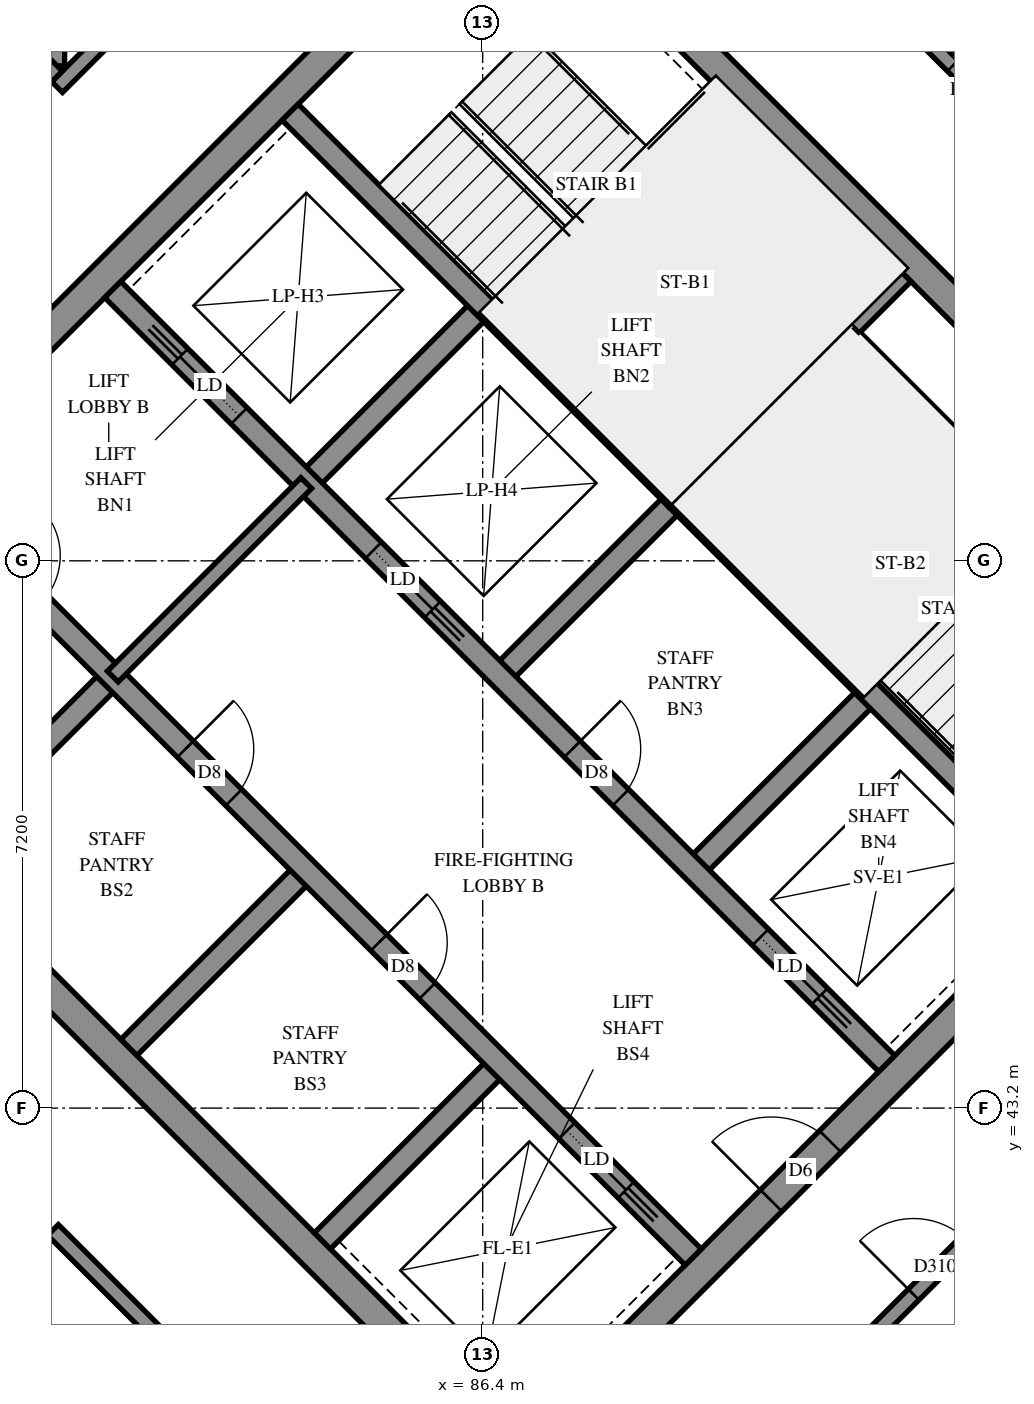
"""IFC4 building model, lengths in metres.
Left out: names, types, materials, properties, quantities, classifications, styles, units other than length and angle.
Written with IfcOpenShell. Run it as: python <this file> out.ifc"""

import sys

from ifc_helpers import new_model, si_unit, direction, frame, frame_2d, origin, place, context, subcontext, project, spatial, polyline, rectangle, outline, extrude, element, fill, save


model = new_model("IFC4")
c1 = context("Model", 3, precision=1e-05, world=origin(), true_north=direction((0.0, 1.0)))
c2 = subcontext(c1, "Body", "Model", "MODEL_VIEW")
j1 = project(units=[si_unit("LENGTHUNIT", "METRE"), si_unit("PLANEANGLEUNIT", "RADIAN")], contexts=[c1])
p1 = place(None, origin())
s1 = spatial("IfcSite", under=j1, at=p1, CompositionType="ELEMENT")
p2 = place(p1, origin())
s2 = spatial("IfcBuilding", under=s1, at=p2, CompositionType="ELEMENT")
p3 = place(p2, frame((0.0, 0.0, 281.2)))
s3 = spatial("IfcBuildingStorey", under=s2, at=p3, CompositionType="ELEMENT", Elevation=281.2)
p4 = place(p3, frame((76.23, 49.231, -0.3), z_axis=(0.0, 0.0, 1.0), x_axis=(0.7071034917, -0.7071100706, 0.0)))
e1 = element("IfcWall", 1, at=p4, inside=s3, PredefinedType="SHEAR", context=c2, shape_type="SweptSolid", body=[
    extrude(rectangle(XDim=15.2, YDim=0.4, at=frame_2d((7.6, 0.0))), origin(), (0.0, 0.0, 1.0), 2.7),
])
p5 = place(p3, frame((86.695, 59.696, -0.3), z_axis=(0.0, 0.0, 1.0), x_axis=(0.7071100706, -0.7071034917, 0.0)))
e2 = element("IfcWall", 2, at=p5, inside=s3, PredefinedType="SHEAR", context=c2, shape_type="SweptSolid", body=[
    extrude(rectangle(XDim=15.2, YDim=0.4, at=frame_2d((7.6, 0.0))), origin(), (0.0, 0.0, 1.0), 2.7),
])
p6 = place(p5, frame((10.4, 0.0, 0.3)))
e3 = element("IfcOpeningElement", 3, at=p6, cuts=e2, PredefinedType="OPENING", context=c2, shape_type="SweptSolid", body=[
    extrude(rectangle(XDim=0.8, YDim=2.1, at=frame_2d((0.4, 1.05))), frame((0.0, 0.21, 0.0), z_axis=(0.0, -1.0, 0.0), x_axis=(1.0, 0.0, 0.0)), (0.0, 0.0, 1.0), 0.42),
])
p7 = place(p3, frame((76.513, 49.231, -0.3), z_axis=(0.0, 0.0, 1.0), x_axis=(0.7071067812, 0.7071067812, 0.0)))
e4 = element("IfcWall", 4, at=p7, inside=s3, PredefinedType="SHEAR", context=c2, shape_type="SweptSolid", body=[
    extrude(rectangle(XDim=14.4, YDim=0.4, at=frame_2d((7.2, 0.0))), origin(), (0.0, 0.0, 1.0), 2.7),
])
p8 = place(p7, frame((4.55, 0.0, 0.3)))
e5 = element("IfcOpeningElement", 5, at=p8, cuts=e4, PredefinedType="OPENING", context=c2, shape_type="SweptSolid", body=[
    extrude(rectangle(XDim=1.1, YDim=2.1, at=frame_2d((0.55, 1.05))), frame((0.0, 0.21, 0.0), z_axis=(0.0, -1.0, 0.0), x_axis=(1.0, 0.0, 0.0)), (0.0, 0.0, 1.0), 0.42),
])
p9 = place(p7, frame((11.35, 0.0, 0.3)))
e6 = element("IfcOpeningElement", 6, at=p9, cuts=e4, PredefinedType="OPENING", context=c2, shape_type="SweptSolid", body=[
    extrude(rectangle(XDim=1.1, YDim=2.1, at=frame_2d((0.55, 1.05))), frame((0.0, 0.21, 0.0), z_axis=(0.0, -1.0, 0.0), x_axis=(1.0, 0.0, 0.0)), (0.0, 0.0, 1.0), 0.42),
])
p10 = place(p3, frame((86.978, 38.766, -0.3), z_axis=(0.0, 0.0, 1.0), x_axis=(0.7071067812, 0.7071067812, 0.0)))
e7 = element("IfcWall", 7, at=p10, inside=s3, PredefinedType="SHEAR", context=c2, shape_type="SweptSolid", body=[
    extrude(rectangle(XDim=14.4, YDim=0.4, at=frame_2d((7.2, 0.0))), origin(), (0.0, 0.0, 1.0), 2.7),
])
p11 = place(p10, frame((4.55, 0.0, 0.3)))
e8 = element("IfcOpeningElement", 8, at=p11, cuts=e7, PredefinedType="OPENING", context=c2, shape_type="SweptSolid", body=[
    extrude(rectangle(XDim=1.1, YDim=2.1, at=frame_2d((0.55, 1.05))), frame((0.0, 0.21, 0.0), z_axis=(0.0, -1.0, 0.0), x_axis=(1.0, 0.0, 0.0)), (0.0, 0.0, 1.0), 0.42),
])
p12 = place(p10, frame((11.35, 0.0, 0.3)))
e9 = element("IfcOpeningElement", 9, at=p12, cuts=e7, PredefinedType="OPENING", context=c2, shape_type="SweptSolid", body=[
    extrude(rectangle(XDim=1.1, YDim=2.1, at=frame_2d((0.55, 1.05))), frame((0.0, 0.21, 0.0), z_axis=(0.0, -1.0, 0.0), x_axis=(1.0, 0.0, 0.0)), (0.0, 0.0, 1.0), 0.42),
])
for number, where, z_axis, x_axis in (
    (10, (79.2, 46.544, 0.0), (0.0, 0.0, 1.0), (0.707, 0.707, 0.0)),
    (11, (84.079, 51.423, 0.0), (0.0, 0.0, 1.0), (0.707, 0.707, 0.0)),
):
    element("IfcWall", number, at=place(p3, frame(where, z_axis=z_axis, x_axis=x_axis)), inside=s3, PredefinedType="SOLIDWALL", context=c2, shape_type="SweptSolid", body=[
        extrude(rectangle(XDim=3.3, YDim=0.3, at=frame_2d((1.65, 0.0))), origin(), (0.0, 0.0, 1.0), 3.1),
    ])
p13 = place(p3, frame((81.746, 43.999, 0.0), z_axis=(0.0, 0.0, 1.0), x_axis=(0.7071067812, 0.7071067812, 0.0)))
e12 = element("IfcWall", 12, at=p13, inside=s3, PredefinedType="SOLIDWALL", context=c2, shape_type="SweptSolid", body=[
    extrude(rectangle(XDim=3.3, YDim=0.3, at=frame_2d((1.65, 0.0))), origin(), (0.0, 0.0, 1.0), 3.1),
])
p14 = place(p3, frame((86.625, 48.878, 0.0), z_axis=(0.0, 0.0, 1.0), x_axis=(0.7071067812, 0.7071067812, 0.0)))
e13 = element("IfcWall", 13, at=p14, inside=s3, PredefinedType="SOLIDWALL", context=c2, shape_type="SweptSolid", body=[
    extrude(rectangle(XDim=3.3, YDim=0.3, at=frame_2d((1.65, 0.0))), origin(), (0.0, 0.0, 1.0), 3.1),
])
p15 = place(p3, frame((84.291, 41.453, 0.0), z_axis=(0.0, 0.0, 1.0), x_axis=(0.7071067812, 0.7071067812, 0.0)))
e14 = element("IfcWall", 14, at=p15, inside=s3, PredefinedType="SOLIDWALL", context=c2, shape_type="SweptSolid", body=[
    extrude(rectangle(XDim=3.3, YDim=0.3, at=frame_2d((1.65, 0.0))), origin(), (0.0, 0.0, 1.0), 3.1),
])
p16 = place(p3, frame((89.17, 46.332, 0.0), z_axis=(0.0, 0.0, 1.0), x_axis=(0.7071067812, 0.7071067812, 0.0)))
e15 = element("IfcWall", 15, at=p16, inside=s3, PredefinedType="SOLIDWALL", context=c2, shape_type="SweptSolid", body=[
    extrude(rectangle(XDim=3.3, YDim=0.3, at=frame_2d((1.65, 0.0))), origin(), (0.0, 0.0, 1.0), 3.1),
])
p17 = place(p3, frame((78.988, 51.423, 0.0), z_axis=(0.0, 0.0, 1.0), x_axis=(0.7071067812, -0.7071067812, 0.0)))
e16 = element("IfcWall", 16, at=p17, inside=s3, PredefinedType="SOLIDWALL", context=c2, shape_type="SweptSolid", body=[
    extrude(rectangle(XDim=14.4, YDim=0.3, at=frame_2d((7.2, 0.0))), origin(), (0.0, 0.0, 1.0), 3.1),
])
p18 = place(p17, frame((1.35, 0.0, 0.0)))
e17 = element("IfcOpeningElement", 17, at=p18, cuts=e16, PredefinedType="OPENING", context=c2, shape_type="SweptSolid", body=[
    extrude(rectangle(XDim=0.9, YDim=2.1, at=frame_2d((0.45, 1.05))), frame((0.0, 0.16, 0.0), z_axis=(0.0, -1.0, 0.0), x_axis=(1.0, 0.0, 0.0)), (0.0, 0.0, 1.0), 0.32),
])
p19 = place(p17, frame((4.95, 0.0, 0.0)))
e18 = element("IfcOpeningElement", 18, at=p19, cuts=e16, PredefinedType="OPENING", context=c2, shape_type="SweptSolid", body=[
    extrude(rectangle(XDim=0.9, YDim=2.1, at=frame_2d((0.45, 1.05))), frame((0.0, 0.16, 0.0), z_axis=(0.0, -1.0, 0.0), x_axis=(1.0, 0.0, 0.0)), (0.0, 0.0, 1.0), 0.32),
])
p20 = place(p17, frame((8.55, 0.0, 0.0)))
e19 = element("IfcOpeningElement", 19, at=p20, cuts=e16, PredefinedType="OPENING", context=c2, shape_type="SweptSolid", body=[
    extrude(rectangle(XDim=0.9, YDim=2.1, at=frame_2d((0.45, 1.05))), frame((0.0, 0.16, 0.0), z_axis=(0.0, -1.0, 0.0), x_axis=(1.0, 0.0, 0.0)), (0.0, 0.0, 1.0), 0.32),
])
p21 = place(p17, frame((12.05, 0.0, 0.0)))
e20 = element("IfcOpeningElement", 20, at=p21, cuts=e16, PredefinedType="OPENING", context=c2, shape_type="SweptSolid", body=[
    extrude(rectangle(XDim=1.1, YDim=2.1, at=frame_2d((0.55, 1.05))), frame((0.0, 0.16, 0.0), z_axis=(0.0, -1.0, 0.0), x_axis=(1.0, 0.0, 0.0)), (0.0, 0.0, 1.0), 0.32),
])
p22 = place(p3, frame((81.534, 53.969, 0.0), z_axis=(0.0, 0.0, 1.0), x_axis=(0.707103309, -0.7071102534, 0.0)))
e21 = element("IfcWall", 21, at=p22, inside=s3, PredefinedType="SOLIDWALL", context=c2, shape_type="SweptSolid", body=[
    extrude(rectangle(XDim=14.4, YDim=0.3, at=frame_2d((7.2, 0.0))), origin(), (0.0, 0.0, 1.0), 3.1),
])
p23 = place(p22, frame((8.55, 0.0, 0.0)))
e22 = element("IfcOpeningElement", 22, at=p23, cuts=e21, PredefinedType="OPENING", context=c2, shape_type="SweptSolid", body=[
    extrude(rectangle(XDim=0.9, YDim=2.1, at=frame_2d((0.45, 1.05))), frame((0.0, 0.16, 0.0), z_axis=(0.0, -1.0, 0.0), x_axis=(1.0, 0.0, 0.0)), (0.0, 0.0, 1.0), 0.32),
])
p24 = place(p22, frame((1.25, 0.0, 0.0)))
e23 = element("IfcOpeningElement", 23, at=p24, cuts=e21, PredefinedType="OPENING", context=c2, shape_type="SweptSolid", body=[
    extrude(rectangle(XDim=1.1, YDim=2.1, at=frame_2d((0.55, 1.05))), frame((0.0, 0.16, 0.0), z_axis=(0.0, -1.0, 0.0), x_axis=(1.0, 0.0, 0.0)), (0.0, 0.0, 1.0), 0.32),
])
p25 = place(p22, frame((4.85, 0.0, 0.0)))
e24 = element("IfcOpeningElement", 24, at=p25, cuts=e21, PredefinedType="OPENING", context=c2, shape_type="SweptSolid", body=[
    extrude(rectangle(XDim=1.1, YDim=2.1, at=frame_2d((0.55, 1.05))), frame((0.0, 0.16, 0.0), z_axis=(0.0, -1.0, 0.0), x_axis=(1.0, 0.0, 0.0)), (0.0, 0.0, 1.0), 0.32),
])
p26 = place(p22, frame((12.05, 0.0, 0.0)))
e25 = element("IfcOpeningElement", 25, at=p26, cuts=e21, PredefinedType="OPENING", context=c2, shape_type="SweptSolid", body=[
    extrude(rectangle(XDim=1.1, YDim=2.1, at=frame_2d((0.55, 1.05))), frame((0.0, 0.16, 0.0), z_axis=(0.0, -1.0, 0.0), x_axis=(1.0, 0.0, 0.0)), (0.0, 0.0, 1.0), 0.32),
])
for number, where, z_axis, x_axis in (
    (26, (83.867, 56.302, 0.0), (0.0, 0.0, 1.0), (0.707, -0.707, 0.0)),
    (27, (88.958, 51.211, 0.0), (0.0, 0.0, 1.0), (0.707, -0.707, 0.0)),
):
    element("IfcWall", number, at=place(p3, frame(where, z_axis=z_axis, x_axis=x_axis)), inside=s3, PredefinedType="SOLIDWALL", context=c2, shape_type="SweptSolid", body=[
        extrude(rectangle(XDim=7.2, YDim=0.3, at=frame_2d((3.6, 0.0))), origin(), (0.0, 0.0, 1.0), 3.1),
    ])
p27 = place(p3, frame((88.958, 51.211, 0.0), z_axis=(0.0, 0.0, 1.0), x_axis=(0.7071067812, 0.7071067812, 0.0)))
e28 = element("IfcWall", 28, at=p27, inside=s3, PredefinedType="SOLIDWALL", context=c2, shape_type="SweptSolid", body=[
    extrude(rectangle(XDim=4.2, YDim=0.3, at=frame_2d((2.1, 0.0))), origin(), (0.0, 0.0, 1.0), 3.1),
])
p28 = place(p3, frame((95.712, 56.867, 0.0), z_axis=(0.0, 0.0, 1.0), x_axis=(-0.7071067812, 0.7071067812, 0.0)))
e29 = element("IfcWall", 29, at=p28, inside=s3, PredefinedType="SOLIDWALL", context=c2, shape_type="SweptSolid", body=[
    extrude(outline(polyline([(0.0, -0.225), (6.682, -0.225), (6.682, 0.225), (0.0, 0.225), (0.0, -0.225)])), origin(), (0.0, 0.0, 1.0), 3.1),
])
p29 = place(p28, frame((1.177, 0.0, 0.45)))
e30 = element("IfcOpeningElement", 30, at=p29, cuts=e29, PredefinedType="OPENING", context=c2, shape_type="SweptSolid", body=[
    extrude(rectangle(XDim=2.8, YDim=2.55, at=frame_2d((1.4, 1.275))), frame((0.0, 0.235, 0.0), z_axis=(0.0, -1.0, 0.0), x_axis=(1.0, 0.0, 0.0)), (0.0, 0.0, 1.0), 0.47),
])
p30 = place(p3, frame((78.311, 40.963, 0.0), z_axis=(0.0, 0.0, 1.0), x_axis=(0.7071067812, -0.7071067812, 0.0)))
e31 = element("IfcWall", 31, at=p30, inside=s3, PredefinedType="SOLIDWALL", context=c2, shape_type="SweptSolid", body=[
    extrude(outline(polyline([(0.052, -0.225), (15.882, -0.225), (15.432, 0.225), (-0.052, 0.225), (0.052, -0.225)])), origin(), (0.0, 0.0, 1.0), 3.1),
])
p31 = place(p30, frame((0.641, 0.0, 0.45)))
e32 = element("IfcOpeningElement", 32, at=p31, cuts=e31, PredefinedType="OPENING", context=c2, shape_type="SweptSolid", body=[
    extrude(rectangle(XDim=2.8, YDim=2.55, at=frame_2d((1.4, 1.275))), frame((0.0, 0.235, 0.0), z_axis=(0.0, -1.0, 0.0), x_axis=(1.0, 0.0, 0.0)), (0.0, 0.0, 1.0), 0.47),
])
p32 = place(p30, frame((4.282, 0.0, 0.45)))
e33 = element("IfcOpeningElement", 33, at=p32, cuts=e31, PredefinedType="OPENING", context=c2, shape_type="SweptSolid", body=[
    extrude(rectangle(XDim=2.8, YDim=2.55, at=frame_2d((1.4, 1.275))), frame((0.0, 0.235, 0.0), z_axis=(0.0, -1.0, 0.0), x_axis=(1.0, 0.0, 0.0)), (0.0, 0.0, 1.0), 0.47),
])
p33 = place(p30, frame((7.882, 0.0, 0.45)))
e34 = element("IfcOpeningElement", 34, at=p33, cuts=e31, PredefinedType="OPENING", context=c2, shape_type="SweptSolid", body=[
    extrude(rectangle(XDim=2.8, YDim=2.55, at=frame_2d((1.4, 1.275))), frame((0.0, 0.235, 0.0), z_axis=(0.0, -1.0, 0.0), x_axis=(1.0, 0.0, 0.0)), (0.0, 0.0, 1.0), 0.47),
])
p34 = place(p30, frame((11.482, 0.0, 0.45)))
e35 = element("IfcOpeningElement", 35, at=p34, cuts=e31, PredefinedType="OPENING", context=c2, shape_type="SweptSolid", body=[
    extrude(rectangle(XDim=2.8, YDim=2.55, at=frame_2d((1.4, 1.275))), frame((0.0, 0.235, 0.0), z_axis=(0.0, -1.0, 0.0), x_axis=(1.0, 0.0, 0.0)), (0.0, 0.0, 1.0), 0.47),
])
p35 = place(p3, frame((91.313, 53.354, 0.0), z_axis=(0.0, 0.0, 1.0), x_axis=(0.7071067812, -0.7071067812, 0.0)))
e36 = element("IfcWall", 36, at=p35, inside=s3, PredefinedType="PARTITIONING", context=c2, shape_type="SweptSolid", body=[
    extrude(rectangle(XDim=5.65, YDim=0.15, at=frame_2d((2.825, 0.0))), origin(), (0.0, 0.0, 1.0), 3.1),
])
p36 = place(p3, frame((81.534, 48.878, 0.0), z_axis=(0.0, 0.0, 1.0), x_axis=(0.707092892, 0.7071206701, 0.0)))
e37 = element("IfcWall", 37, at=p36, inside=s3, PredefinedType="PARTITIONING", context=c2, shape_type="SweptSolid", body=[
    extrude(rectangle(XDim=3.6, YDim=0.2, at=frame_2d((1.8, 0.0))), origin(), (0.0, 0.0, 1.0), 3.1),
])
p37 = place(p3, frame((86.306, 33.287, 0.0), z_axis=(0.0, 0.0, 1.0), x_axis=(0.7071020418, 0.7071115206, 0.0)))
e38 = element("IfcWall", 38, at=p37, inside=s3, PredefinedType="PARTITIONING", context=c2, shape_type="SweptSolid", body=[
    extrude(rectangle(XDim=10.55, YDim=0.2, at=frame_2d((5.275, 0.0))), origin(), (0.0, 0.0, 1.0), 3.1),
])
p38 = place(p3, frame((80.747, 41.597, 0.0), z_axis=(0.0, 0.0, 1.0), x_axis=(0.7071067812, -0.7071067812, 0.0)))
e39 = element("IfcWall", 39, at=p38, inside=s3, PredefinedType="PARTITIONING", context=c2, shape_type="SweptSolid", body=[
    extrude(rectangle(XDim=8.607, YDim=0.2, at=frame_2d((4.303, 0.0))), origin(), (0.0, 0.0, 1.0), 3.1),
])
p39 = place(p3, frame((86.837, 35.515, 0.0), z_axis=(0.0, 0.0, 1.0), x_axis=(0.7071067812, 0.7071067812, 0.0)))
e40 = element("IfcWall", 40, at=p39, inside=s3, PredefinedType="PARTITIONING", context=c2, shape_type="SweptSolid", body=[
    extrude(rectangle(XDim=8.598, YDim=0.2, at=frame_2d((4.299, 0.0))), origin(), (0.0, 0.0, 1.0), 3.1),
])
p40 = place(p39, frame((7.4, 0.0, 0.0)))
e41 = element("IfcOpeningElement", 41, at=p40, cuts=e40, PredefinedType="OPENING", context=c2, shape_type="SweptSolid", body=[
    extrude(rectangle(XDim=1.0, YDim=2.1, at=frame_2d((0.5, 1.05))), frame((0.0, 0.11, 0.0), z_axis=(0.0, -1.0, 0.0), x_axis=(1.0, 0.0, 0.0)), (0.0, 0.0, 1.0), 0.22),
])
p41 = place(p3, frame((80.802, 56.633, 0.0), z_axis=(0.0, 0.0, 1.0), x_axis=(0.7071067812, 0.7071067812, 0.0)))
e42 = element("IfcWall", 42, at=p41, inside=s3, PredefinedType="PARTITIONING", context=c2, shape_type="SweptSolid", body=[
    extrude(rectangle(XDim=8.533, YDim=0.2, at=frame_2d((4.267, 0.0))), origin(), (0.0, 0.0, 1.0), 3.1),
])
p42 = place(p41, frame((0.853, 0.0, 0.0)))
e43 = element("IfcOpeningElement", 43, at=p42, cuts=e42, PredefinedType="OPENING", context=c2, shape_type="SweptSolid", body=[
    extrude(rectangle(XDim=1.0, YDim=2.1, at=frame_2d((0.5, 1.05))), frame((0.0, 0.11, 0.0), z_axis=(0.0, -1.0, 0.0), x_axis=(1.0, 0.0, 0.0)), (0.0, 0.0, 1.0), 0.22),
])
p43 = place(p3, frame((91.077, 58.421, 0.0), z_axis=(0.0, 0.0, 1.0), x_axis=(0.7069869563, -0.7072265858, 0.0)))
e44 = element("IfcWall", 44, at=p43, inside=s3, PredefinedType="PARTITIONING", context=c2, shape_type="SweptSolid", body=[
    extrude(rectangle(XDim=5.008, YDim=0.2, at=frame_2d((2.504, 0.0))), origin(), (0.0, 0.0, 1.0), 3.1),
])
p44 = place(p43, frame((2.132, 0.0, 0.0)))
e45 = element("IfcOpeningElement", 45, at=p44, cuts=e44, PredefinedType="OPENING", context=c2, shape_type="SweptSolid", body=[
    extrude(rectangle(XDim=0.9, YDim=2.1, at=frame_2d((0.45, 1.05))), frame((0.0, 0.11, 0.0), z_axis=(0.0, -1.0, 0.0), x_axis=(1.0, 0.0, 0.0)), (0.0, 0.0, 1.0), 0.22),
])
p45 = place(p3, frame((80.8, 56.912, 0.0), z_axis=(0.0, 0.0, 1.0), x_axis=(0.0, 1.0, 0.0)))
e46 = element("IfcWall", 46, at=p45, inside=s3, PredefinedType="PARTITIONING", context=c2, shape_type="SweptSolid", body=[
    extrude(rectangle(XDim=1.414, YDim=0.2, at=frame_2d((0.707, 0.0))), origin(), (0.0, 0.0, 1.0), 3.1),
])
p46 = place(p3, frame((79.801, 55.915, 0.0), z_axis=(0.0, 0.0, 1.0), x_axis=(0.7071067812, 0.7071067812, 0.0)))
e47 = element("IfcWall", 47, at=p46, inside=s3, PredefinedType="PARTITIONING", context=c2, shape_type="SweptSolid", body=[
    extrude(rectangle(XDim=1.411, YDim=0.2, at=frame_2d((0.706, 0.0))), origin(), (0.0, 0.0, 1.0), 3.1),
])
p47 = place(p31, origin())
e48 = element("IfcWindow", 48, at=p47, inside=s3, PartitioningType="SINGLE_PANEL", PredefinedType="WINDOW", context=c2, shape_type="SweptSolid", body=[
    extrude(rectangle(XDim=2.8, YDim=2.55, at=frame_2d((1.4, 1.275))), frame((0.0, 0.205, 0.0), z_axis=(0.0, -1.0, 0.0), x_axis=(1.0, 0.0, 0.0)), (0.0, 0.0, 1.0), 0.06),
])
fill(e32, e48)
p48 = place(p11, origin())
e49 = element("IfcDoor", 49, at=p48, inside=s3, OperationType="DOUBLE_DOOR_SINGLE_SWING", PredefinedType="DOOR", context=c2, shape_type="SweptSolid", body=[
    extrude(rectangle(XDim=1.1, YDim=2.1, at=frame_2d((0.55, 1.05))), frame((0.0, 0.025, 0.0), z_axis=(0.0, -1.0, 0.0), x_axis=(1.0, 0.0, 0.0)), (0.0, 0.0, 1.0), 0.05),
])
fill(e8, e49)
p49 = place(p19, origin())
e50 = element("IfcDoor", 50, at=p49, inside=s3, OperationType="SINGLE_SWING_LEFT", PredefinedType="DOOR", context=c2, shape_type="SweptSolid", body=[
    extrude(rectangle(XDim=0.9, YDim=2.1, at=frame_2d((0.45, 1.05))), frame((0.0, 0.025, 0.0), z_axis=(0.0, -1.0, 0.0), x_axis=(1.0, 0.0, 0.0)), (0.0, 0.0, 1.0), 0.05),
])
fill(e18, e50)
p50 = place(p20, origin())
e51 = element("IfcDoor", 51, at=p50, inside=s3, OperationType="SINGLE_SWING_LEFT", PredefinedType="DOOR", context=c2, shape_type="SweptSolid", body=[
    extrude(rectangle(XDim=0.9, YDim=2.1, at=frame_2d((0.45, 1.05))), frame((0.0, 0.025, 0.0), z_axis=(0.0, -1.0, 0.0), x_axis=(1.0, 0.0, 0.0)), (0.0, 0.0, 1.0), 0.05),
])
fill(e19, e51)
p51 = place(p23, origin())
e52 = element("IfcDoor", 52, at=p51, inside=s3, OperationType="SINGLE_SWING_LEFT", PredefinedType="DOOR", context=c2, shape_type="SweptSolid", body=[
    extrude(rectangle(XDim=0.9, YDim=2.1, at=frame_2d((0.45, 1.05))), frame((0.0, 0.025, 0.0), z_axis=(0.0, -1.0, 0.0), x_axis=(1.0, 0.0, 0.0)), (0.0, 0.0, 1.0), 0.05),
])
fill(e22, e52)
p52 = place(p21, origin())
e53 = element("IfcDoor", 53, at=p52, inside=s3, OperationType="SLIDING_TO_RIGHT", PredefinedType="DOOR", context=c2, shape_type="SweptSolid", body=[
    extrude(rectangle(XDim=1.1, YDim=2.1, at=frame_2d((0.55, 1.05))), frame((0.0, 0.025, 0.0), z_axis=(0.0, -1.0, 0.0), x_axis=(1.0, 0.0, 0.0)), (0.0, 0.0, 1.0), 0.05),
])
fill(e20, e53)
p53 = place(p24, origin())
e54 = element("IfcDoor", 54, at=p53, inside=s3, OperationType="SLIDING_TO_LEFT", PredefinedType="DOOR", context=c2, shape_type="SweptSolid", body=[
    extrude(rectangle(XDim=1.1, YDim=2.1, at=frame_2d((0.55, 1.05))), frame((0.0, 0.025, 0.0), z_axis=(0.0, -1.0, 0.0), x_axis=(1.0, 0.0, 0.0)), (0.0, 0.0, 1.0), 0.05),
])
fill(e23, e54)
p54 = place(p25, origin())
e55 = element("IfcDoor", 55, at=p54, inside=s3, OperationType="SLIDING_TO_RIGHT", PredefinedType="DOOR", context=c2, shape_type="SweptSolid", body=[
    extrude(rectangle(XDim=1.1, YDim=2.1, at=frame_2d((0.55, 1.05))), frame((0.0, 0.025, 0.0), z_axis=(0.0, -1.0, 0.0), x_axis=(1.0, 0.0, 0.0)), (0.0, 0.0, 1.0), 0.05),
])
fill(e24, e55)
p55 = place(p26, origin())
e56 = element("IfcDoor", 56, at=p55, inside=s3, OperationType="SLIDING_TO_RIGHT", PredefinedType="DOOR", context=c2, shape_type="SweptSolid", body=[
    extrude(rectangle(XDim=1.1, YDim=2.1, at=frame_2d((0.55, 1.05))), frame((0.0, 0.025, 0.0), z_axis=(0.0, -1.0, 0.0), x_axis=(1.0, 0.0, 0.0)), (0.0, 0.0, 1.0), 0.05),
])
fill(e25, e56)
p56 = place(p44, origin())
e57 = element("IfcDoor", 57, at=p56, inside=s3, OperationType="SINGLE_SWING_LEFT", PredefinedType="DOOR", context=c2, shape_type="SweptSolid", body=[
    extrude(rectangle(XDim=0.9, YDim=2.1, at=frame_2d((0.45, 1.05))), frame((0.0, 0.025, 0.0), z_axis=(0.0, -1.0, 0.0), x_axis=(1.0, 0.0, 0.0)), (0.0, 0.0, 1.0), 0.05),
])
fill(e45, e57)
p57 = place(p40, origin())
e58 = element("IfcDoor", 58, at=p57, inside=s3, OperationType="SINGLE_SWING_LEFT", PredefinedType="DOOR", context=c2, shape_type="SweptSolid", body=[
    extrude(rectangle(XDim=1.0, YDim=2.1, at=frame_2d((0.5, 1.05))), frame((0.0, 0.025, 0.0), z_axis=(0.0, -1.0, 0.0), x_axis=(1.0, 0.0, 0.0)), (0.0, 0.0, 1.0), 0.05),
])
fill(e41, e58)
save(model, sys.argv[1])
